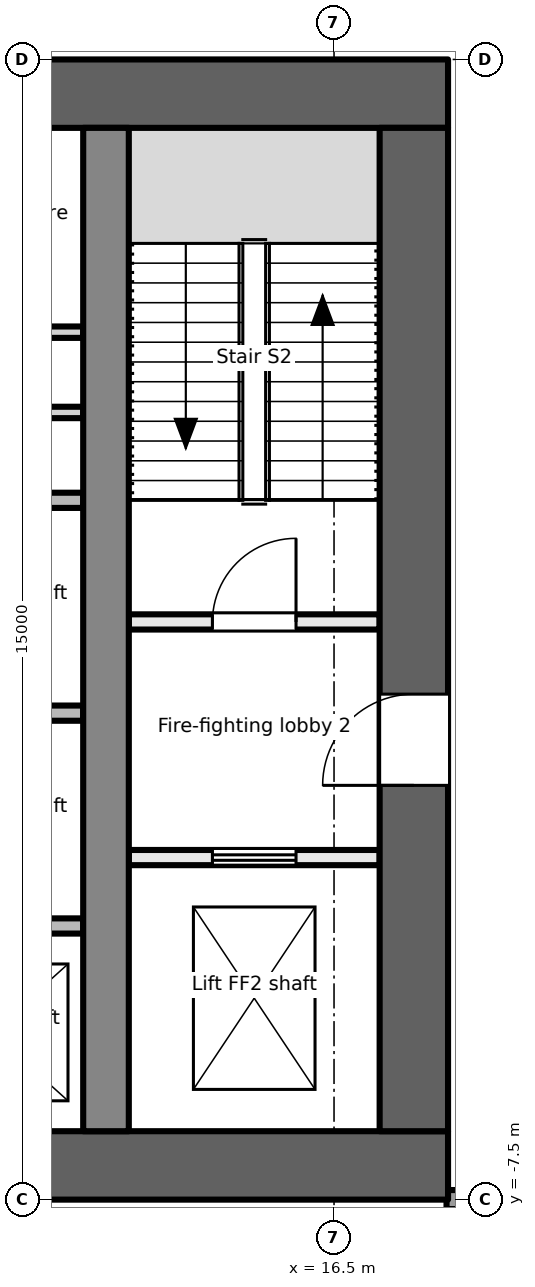
"""IFC4 building model, lengths in metres.
Left out: names, types, materials, properties, quantities, classifications, styles, units other than length and angle.
Written with IfcOpenShell. Run it as: python <this file> out.ifc"""

import sys

from ifc_helpers import new_model, si_unit, direction, frame, frame_2d, origin, place, context, subcontext, project, spatial, rectangle, extrude, element, fill, save


model = new_model("IFC4")
c1 = context("Model", 3, precision=1e-05, world=origin(), true_north=direction((0.0, 1.0)))
c2 = subcontext(c1, "Body", "Model", "MODEL_VIEW")
j1 = project(units=[si_unit("LENGTHUNIT", "METRE"), si_unit("PLANEANGLEUNIT", "RADIAN")], contexts=[c1])
p1 = place(None, origin())
s1 = spatial("IfcSite", under=j1, at=p1, CompositionType="ELEMENT")
p2 = place(p1, origin())
s2 = spatial("IfcBuilding", under=s1, at=p2, CompositionType="ELEMENT")
p3 = place(p2, frame((0.0, 0.0, 158.1)))
s3 = spatial("IfcBuildingStorey", under=s2, at=p3, CompositionType="ELEMENT", Elevation=158.1)
p4 = place(p3, frame((-18.0, -7.05, -0.2), z_axis=(0.0, 0.0, 1.0), x_axis=(1.0, 0.0, 0.0)))
e1 = element("IfcWall", 1, at=p4, inside=s3, PredefinedType="SHEAR", context=c2, shape_type="SweptSolid", body=[
    extrude(rectangle(XDim=36.0, YDim=0.9, at=frame_2d((18.0, 0.0))), origin(), (0.0, 0.0, 1.0), 5.0),
])
p5 = place(p4, frame((7.8, 0.0, 0.2)))
e2 = element("IfcOpeningElement", 2, at=p5, cuts=e1, PredefinedType="OPENING", context=c2, shape_type="SweptSolid", body=[
    extrude(rectangle(XDim=2.4, YDim=2.1, at=frame_2d((1.2, 1.05))), frame((0.0, 0.46, 0.0), z_axis=(0.0, -1.0, 0.0), x_axis=(1.0, 0.0, 0.0)), (0.0, 0.0, 1.0), 0.921),
])
p6 = place(p4, frame((17.4, 0.0, 0.2)))
e3 = element("IfcOpeningElement", 3, at=p6, cuts=e1, PredefinedType="OPENING", context=c2, shape_type="SweptSolid", body=[
    extrude(rectangle(XDim=1.2, YDim=2.1, at=frame_2d((0.6, 1.05))), frame((0.0, 0.46, 0.0), z_axis=(0.0, -1.0, 0.0), x_axis=(1.0, 0.0, 0.0)), (0.0, 0.0, 1.0), 0.921),
])
p7 = place(p4, frame((26.1, 0.0, 0.2)))
e4 = element("IfcOpeningElement", 4, at=p7, cuts=e1, PredefinedType="OPENING", context=c2, shape_type="SweptSolid", body=[
    extrude(rectangle(XDim=2.4, YDim=2.1, at=frame_2d((1.2, 1.05))), frame((0.0, 0.46, 0.0), z_axis=(0.0, -1.0, 0.0), x_axis=(1.0, 0.0, 0.0)), (0.0, 0.0, 1.0), 0.921),
])
p8 = place(p3, frame((-18.0, 7.05, -0.2), z_axis=(0.0, 0.0, 1.0), x_axis=(1.0, 0.0, 0.0)))
e5 = element("IfcWall", 5, at=p8, inside=s3, PredefinedType="SHEAR", context=c2, shape_type="SweptSolid", body=[
    extrude(rectangle(XDim=36.0, YDim=0.9, at=frame_2d((18.0, 0.0))), origin(), (0.0, 0.0, 1.0), 5.0),
])
p9 = place(p3, frame((17.55, -6.6, -0.2), z_axis=(0.0, 0.0, 1.0), x_axis=(0.0, 1.0, 0.0)))
e6 = element("IfcWall", 6, at=p9, inside=s3, PredefinedType="SHEAR", context=c2, shape_type="SweptSolid", body=[
    extrude(rectangle(XDim=13.2, YDim=0.9, at=frame_2d((6.6, 0.0))), origin(), (0.0, 0.0, 1.0), 5.0),
])
p10 = place(p9, frame((4.55, 0.0, 0.2)))
e7 = element("IfcOpeningElement", 7, at=p10, cuts=e6, PredefinedType="OPENING", context=c2, shape_type="SweptSolid", body=[
    extrude(rectangle(XDim=1.2, YDim=2.1, at=frame_2d((0.6, 1.05))), frame((0.0, 0.46, 0.0), z_axis=(0.0, -1.0, 0.0), x_axis=(1.0, 0.0, 0.0)), (0.0, 0.0, 1.0), 0.921),
])
p11 = place(p3, frame((13.5, -6.6, -0.2), z_axis=(0.0, 0.0, 1.0), x_axis=(0.0, 1.0, 0.0)))
e8 = element("IfcWall", 8, at=p11, inside=s3, PredefinedType="SHEAR", context=c2, shape_type="SweptSolid", body=[
    extrude(rectangle(XDim=13.2, YDim=0.6, at=frame_2d((6.6, 0.0))), origin(), (0.0, 0.0, 1.0), 5.0),
])
p12 = place(p3, frame((13.8, -3.0, 0.0), z_axis=(0.0, 0.0, 1.0), x_axis=(1.0, 0.0, 0.0)))
e9 = element("IfcWall", 9, at=p12, inside=s3, PredefinedType="PARTITIONING", context=c2, shape_type="SweptSolid", body=[
    extrude(rectangle(XDim=3.3, YDim=0.2, at=frame_2d((1.65, 0.0))), origin(), (0.0, 0.0, 1.0), 4.8),
])
p13 = place(p12, frame((1.1, 0.0, 0.0)))
e10 = element("IfcOpeningElement", 10, at=p13, cuts=e9, PredefinedType="OPENING", context=c2, shape_type="SweptSolid", body=[
    extrude(rectangle(XDim=1.1, YDim=2.1, at=frame_2d((0.55, 1.05))), frame((0.0, 0.111, 0.0), z_axis=(0.0, -1.0, 0.0), x_axis=(1.0, 0.0, 0.0)), (0.0, 0.0, 1.0), 0.221),
])
p14 = place(p3, frame((13.8, 0.1, 0.0), z_axis=(0.0, 0.0, 1.0), x_axis=(1.0, 0.0, 0.0)))
e11 = element("IfcWall", 11, at=p14, inside=s3, PredefinedType="PARTITIONING", context=c2, shape_type="SweptSolid", body=[
    extrude(rectangle(XDim=3.3, YDim=0.2, at=frame_2d((1.65, 0.0))), origin(), (0.0, 0.0, 1.0), 4.8),
])
p15 = place(p14, frame((1.1, 0.0, 0.0)))
e12 = element("IfcOpeningElement", 12, at=p15, cuts=e11, PredefinedType="OPENING", context=c2, shape_type="SweptSolid", body=[
    extrude(rectangle(XDim=1.1, YDim=2.1, at=frame_2d((0.55, 1.05))), frame((0.0, 0.111, 0.0), z_axis=(0.0, -1.0, 0.0), x_axis=(1.0, 0.0, 0.0)), (0.0, 0.0, 1.0), 0.221),
])
for number, where, z_axis, x_axis in (
    (13, (10.9, -3.9, 0.0), (0.0, 0.0, 1.0), (1.0, 0.0, 0.0)),
    (14, (10.9, -1.1, 0.0), (0.0, 0.0, 1.0), (1.0, 0.0, 0.0)),
    (15, (10.9, 1.7, 0.0), (0.0, 0.0, 1.0), (1.0, 0.0, 0.0)),
):
    element("IfcWall", number, at=place(p3, frame(where, z_axis=z_axis, x_axis=x_axis)), inside=s3, PredefinedType="PARTITIONING", context=c2, shape_type="SweptSolid", body=[
        extrude(rectangle(XDim=2.3, YDim=0.2, at=frame_2d((1.15, 0.0))), origin(), (0.0, 0.0, 1.0), 4.8),
    ])
for number, where, z_axis, x_axis in (
    (16, (10.9, 2.856, 0.0), (0.0, 0.0, 1.0), (1.0, 0.0, 0.0)),
    (17, (10.9, 3.912, 0.0), (0.0, 0.0, 1.0), (1.0, 0.0, 0.0)),
):
    element("IfcWall", number, at=place(p3, frame(where, z_axis=z_axis, x_axis=x_axis)), inside=s3, PredefinedType="PARTITIONING", context=c2, shape_type="SweptSolid", body=[
        extrude(rectangle(XDim=2.3, YDim=0.15, at=frame_2d((1.15, 0.0))), origin(), (0.0, 0.0, 1.0), 4.8),
    ])
p16 = place(p3, frame((17.98, -7.499, 0.0), z_axis=(0.0, 0.0, 1.0), x_axis=(1.0, 0.0, 0.0)))
e18 = element("IfcWall", 18, at=p16, inside=s3, PredefinedType="PARTITIONING", context=c2, shape_type="SweptSolid", body=[
    extrude(rectangle(XDim=2.296, YDim=0.25, at=frame_2d((1.148, 0.0))), origin(), (0.0, 0.0, 1.0), 4.8),
])
p17 = place(p13, origin())
e19 = element("IfcDoor", 19, at=p17, inside=s3, OperationType="DOUBLE_DOOR_SLIDING", PredefinedType="DOOR", context=c2, shape_type="SweptSolid", body=[
    extrude(rectangle(XDim=1.1, YDim=2.1, at=frame_2d((0.55, 1.05))), frame((0.0, 0.025, 0.0), z_axis=(0.0, -1.0, 0.0), x_axis=(1.0, 0.0, 0.0)), (0.0, 0.0, 1.0), 0.05),
])
fill(e10, e19)
p18 = place(p10, origin())
e20 = element("IfcDoor", 20, at=p18, inside=s3, OperationType="SINGLE_SWING_LEFT", PredefinedType="DOOR", context=c2, shape_type="SweptSolid", body=[
    extrude(rectangle(XDim=1.2, YDim=2.1, at=frame_2d((0.6, 1.05))), frame((0.0, 0.025, 0.0), z_axis=(0.0, -1.0, 0.0), x_axis=(1.0, 0.0, 0.0)), (0.0, 0.0, 1.0), 0.05),
])
fill(e7, e20)
p19 = place(p15, origin())
e21 = element("IfcDoor", 21, at=p19, inside=s3, OperationType="SINGLE_SWING_RIGHT", PredefinedType="DOOR", context=c2, shape_type="SweptSolid", body=[
    extrude(rectangle(XDim=1.1, YDim=2.1, at=frame_2d((0.55, 1.05))), frame((0.0, 0.025, 0.0), z_axis=(0.0, -1.0, 0.0), x_axis=(1.0, 0.0, 0.0)), (0.0, 0.0, 1.0), 0.05),
])
fill(e12, e21)
save(model, sys.argv[1])
